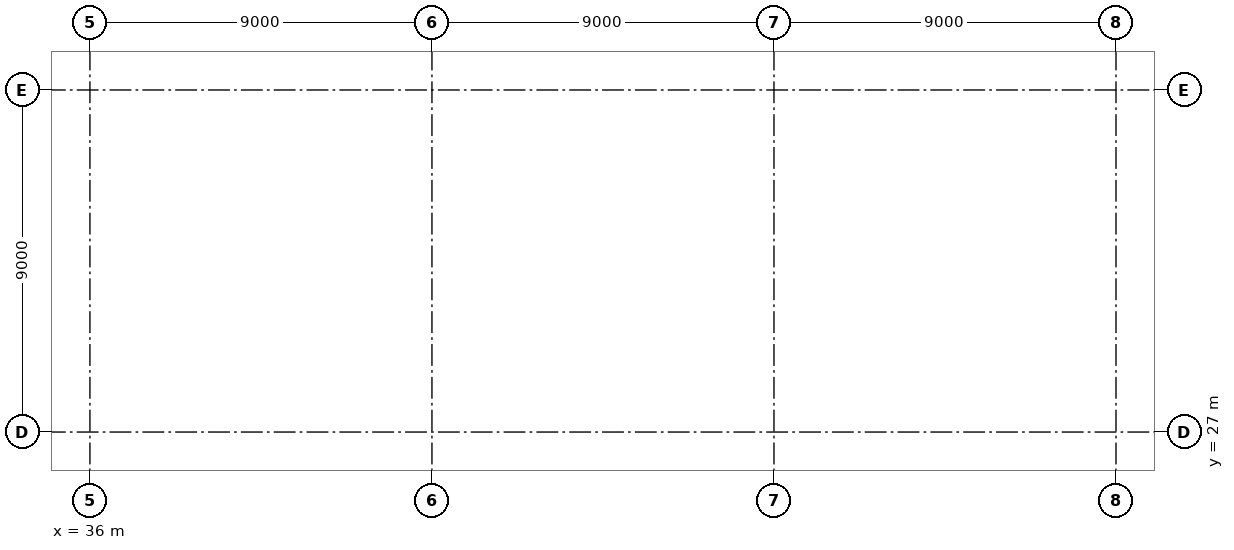
"""IFC4 building model, lengths in metres.
Left out: names, types, materials, properties, quantities, classifications, styles, units other than length and angle.
Written with IfcOpenShell. Run it as: python <this file> out.ifc"""

import sys

from ifc_helpers import new_model, si_unit, direction, frame, frame_2d, origin, origin_2d, place, context, subcontext, project, spatial, rectangle, i_section, extrude, element, fill, save


model = new_model("IFC4")
c1 = context("Model", 3, precision=1e-05, world=origin(), true_north=direction((0.0, 1.0)))
c2 = subcontext(c1, "Body", "Model", "MODEL_VIEW")
j1 = project(units=[si_unit("LENGTHUNIT", "METRE"), si_unit("PLANEANGLEUNIT", "RADIAN")], contexts=[c1])
p1 = place(None, origin())
s1 = spatial("IfcSite", under=j1, at=p1, CompositionType="ELEMENT")
p2 = place(p1, origin())
s2 = spatial("IfcBuilding", under=s1, at=p2, CompositionType="ELEMENT")
p3 = place(p2, origin())
s3 = spatial("IfcBuildingStorey", under=s2, at=p3, CompositionType="ELEMENT", Elevation=0.0)
p4 = place(p3, frame((36.0, 27.0, 0.0), z_axis=(0.0, 0.0, 1.0), x_axis=(1.0, 0.0, 0.0)))
e1 = element("IfcColumn", 1, at=p4, inside=s3, PredefinedType="COLUMN", context=c2, shape_type="SweptSolid", body=[
    extrude(i_section(OverallWidth=0.5, OverallDepth=0.48, WebThickness=0.04, FlangeThickness=0.04, at=origin_2d()), origin(), (0.0, 0.0, 1.0), 5.0),
])
p5 = place(p3, frame((45.0, 27.0, 0.0), z_axis=(0.0, 0.0, 1.0), x_axis=(1.0, 0.0, 0.0)))
e2 = element("IfcColumn", 2, at=p5, inside=s3, PredefinedType="COLUMN", context=c2, shape_type="SweptSolid", body=[
    extrude(i_section(OverallWidth=0.309, OverallDepth=0.321, WebThickness=0.014, FlangeThickness=0.022, FilletRadius=0.017, at=origin_2d()), origin(), (0.0, 0.0, 1.0), 5.0),
])
p6 = place(p3, frame((54.0, 27.0, 0.0), z_axis=(0.0, 0.0, 1.0), x_axis=(1.0, 0.0, 0.0)))
e3 = element("IfcColumn", 3, at=p6, inside=s3, PredefinedType="COLUMN", context=c2, shape_type="SweptSolid", body=[
    extrude(i_section(OverallWidth=0.5, OverallDepth=0.48, WebThickness=0.04, FlangeThickness=0.04, at=origin_2d()), origin(), (0.0, 0.0, 1.0), 5.0),
])
p7 = place(p3, frame((63.0, 27.0, 0.0), z_axis=(0.0, 0.0, 1.0), x_axis=(1.0, 0.0, 0.0)))
e4 = element("IfcColumn", 4, at=p7, inside=s3, PredefinedType="COLUMN", context=c2, shape_type="SweptSolid", body=[
    extrude(i_section(OverallWidth=0.311, OverallDepth=0.327, WebThickness=0.016, FlangeThickness=0.025, FilletRadius=0.017, at=origin_2d()), origin(), (0.0, 0.0, 1.0), 5.0),
])
p8 = place(p3, frame((36.0, 36.0, 0.0), z_axis=(0.0, 0.0, 1.0), x_axis=(1.0, 0.0, 0.0)))
e5 = element("IfcColumn", 5, at=p8, inside=s3, PredefinedType="COLUMN", context=c2, shape_type="SweptSolid", body=[
    extrude(i_section(OverallWidth=0.5, OverallDepth=0.48, WebThickness=0.04, FlangeThickness=0.04, at=origin_2d()), origin(), (0.0, 0.0, 1.0), 5.0),
])
p9 = place(p3, frame((45.0, 36.0, 0.0), z_axis=(0.0, 0.0, 1.0), x_axis=(1.0, 0.0, 0.0)))
e6 = element("IfcColumn", 6, at=p9, inside=s3, PredefinedType="COLUMN", context=c2, shape_type="SweptSolid", body=[
    extrude(i_section(OverallWidth=0.309, OverallDepth=0.321, WebThickness=0.014, FlangeThickness=0.022, FilletRadius=0.017, at=origin_2d()), origin(), (0.0, 0.0, 1.0), 5.0),
])
p10 = place(p3, frame((54.0, 36.0, 0.0), z_axis=(0.0, 0.0, 1.0), x_axis=(1.0, 0.0, 0.0)))
e7 = element("IfcColumn", 7, at=p10, inside=s3, PredefinedType="COLUMN", context=c2, shape_type="SweptSolid", body=[
    extrude(i_section(OverallWidth=0.5, OverallDepth=0.48, WebThickness=0.04, FlangeThickness=0.04, at=origin_2d()), origin(), (0.0, 0.0, 1.0), 5.0),
])
p11 = place(p3, frame((63.0, 36.0, 0.0), z_axis=(0.0, 0.0, 1.0), x_axis=(1.0, 0.0, 0.0)))
e8 = element("IfcColumn", 8, at=p11, inside=s3, PredefinedType="COLUMN", context=c2, shape_type="SweptSolid", body=[
    extrude(i_section(OverallWidth=0.311, OverallDepth=0.327, WebThickness=0.016, FlangeThickness=0.025, FilletRadius=0.017, at=origin_2d()), origin(), (0.0, 0.0, 1.0), 5.0),
])
p12 = place(p3, frame((39.048, 27.1, 0.0), z_axis=(0.0, 0.0, 1.0), x_axis=(1.0, 0.0, 0.0)))
e9 = element("IfcWall", 9, at=p12, inside=s3, PredefinedType="PARTITIONING", context=c2, shape_type="SweptSolid", body=[
    extrude(rectangle(XDim=3.0, YDim=0.2, at=frame_2d((1.5, 0.0))), origin(), (0.0, 0.0, 1.0), 4.228),
])
p13 = place(p12, frame((0.55, 0.0, 0.0)))
e10 = element("IfcOpeningElement", 10, at=p13, cuts=e9, PredefinedType="OPENING", context=c2, shape_type="SweptSolid", body=[
    extrude(rectangle(XDim=1.8, YDim=2.1, at=frame_2d((0.9, 1.05))), frame((0.0, 0.11, 0.0), z_axis=(0.0, -1.0, 0.0), x_axis=(1.0, 0.0, 0.0)), (0.0, 0.0, 1.0), 0.22),
])
for number, where, z_axis, x_axis in (
    (11, (47.952, 27.1, 0.0), (0.0, 0.0, 1.0), (1.0, 0.0, 0.0)),
    (12, (57.047, 27.1, 0.0), (0.0, 0.0, 1.0), (1.0, 0.0, 0.0)),
):
    element("IfcWall", number, at=place(p3, frame(where, z_axis=z_axis, x_axis=x_axis)), inside=s3, PredefinedType="PARTITIONING", context=c2, shape_type="SweptSolid", body=[
        extrude(rectangle(XDim=3.0, YDim=0.2, at=frame_2d((1.5, 0.0))), origin(), (0.0, 0.0, 1.0), 4.228),
    ])
p14 = place(p3, frame((36.1, 30.0, 0.0), z_axis=(0.0, 0.0, 1.0), x_axis=(0.0, 1.0, 0.0)))
e13 = element("IfcWall", 13, at=p14, inside=s3, PredefinedType="PARTITIONING", context=c2, shape_type="SweptSolid", body=[
    extrude(rectangle(XDim=3.0, YDim=0.2, at=frame_2d((1.5, 0.0))), origin(), (0.0, 0.0, 1.0), 4.228),
])
p15 = place(p14, frame((0.55, 0.0, 0.0)))
e14 = element("IfcOpeningElement", 14, at=p15, cuts=e13, PredefinedType="OPENING", context=c2, shape_type="SweptSolid", body=[
    extrude(rectangle(XDim=1.8, YDim=2.1, at=frame_2d((0.9, 1.05))), frame((0.0, 0.11, 0.0), z_axis=(0.0, -1.0, 0.0), x_axis=(1.0, 0.0, 0.0)), (0.0, 0.0, 1.0), 0.22),
])
p16 = place(p3, frame((62.9, 30.0, 0.0), z_axis=(0.0, 0.0, 1.0), x_axis=(0.0, 1.0, 0.0)))
e15 = element("IfcWall", 15, at=p16, inside=s3, PredefinedType="PARTITIONING", context=c2, shape_type="SweptSolid", body=[
    extrude(rectangle(XDim=3.0, YDim=0.2, at=frame_2d((1.5, 0.0))), origin(), (0.0, 0.0, 1.0), 4.228),
])
p17 = place(p16, frame((0.55, 0.0, 0.0)))
e16 = element("IfcOpeningElement", 16, at=p17, cuts=e15, PredefinedType="OPENING", context=c2, shape_type="SweptSolid", body=[
    extrude(rectangle(XDim=1.8, YDim=2.1, at=frame_2d((0.9, 1.05))), frame((0.0, 0.11, 0.0), z_axis=(0.0, -1.0, 0.0), x_axis=(1.0, 0.0, 0.0)), (0.0, 0.0, 1.0), 0.22),
])
p18 = place(p3, frame((39.048, 35.9, 0.0), z_axis=(0.0, 0.0, 1.0), x_axis=(1.0, 0.0, 0.0)))
e17 = element("IfcWall", 17, at=p18, inside=s3, PredefinedType="PARTITIONING", context=c2, shape_type="SweptSolid", body=[
    extrude(rectangle(XDim=3.0, YDim=0.2, at=frame_2d((1.5, 0.0))), origin(), (0.0, 0.0, 1.0), 4.228),
])
p19 = place(p18, frame((0.55, 0.0, 0.0)))
e18 = element("IfcOpeningElement", 18, at=p19, cuts=e17, PredefinedType="OPENING", context=c2, shape_type="SweptSolid", body=[
    extrude(rectangle(XDim=1.8, YDim=2.4, at=frame_2d((0.9, 1.2))), frame((0.0, 0.11, 0.0), z_axis=(0.0, -1.0, 0.0), x_axis=(1.0, 0.0, 0.0)), (0.0, 0.0, 1.0), 0.22),
])
p20 = place(p3, frame((47.952, 35.9, 0.0), z_axis=(0.0, 0.0, 1.0), x_axis=(1.0, 0.0, 0.0)))
e19 = element("IfcWall", 19, at=p20, inside=s3, PredefinedType="PARTITIONING", context=c2, shape_type="SweptSolid", body=[
    extrude(rectangle(XDim=3.0, YDim=0.2, at=frame_2d((1.5, 0.0))), origin(), (0.0, 0.0, 1.0), 4.228),
])
p21 = place(p3, frame((54.25, 35.9, 0.0), z_axis=(0.0, 0.0, 1.0), x_axis=(1.0, 0.0, 0.0)))
e20 = element("IfcWall", 20, at=p21, inside=s3, PredefinedType="PARTITIONING", context=c2, shape_type="SweptSolid", body=[
    extrude(rectangle(XDim=8.594, YDim=0.2, at=frame_2d((4.297, 0.0))), origin(), (0.0, 0.0, 1.0), 4.228),
])
p22 = place(p3, frame((63.0, 36.164, 0.0), z_axis=(0.0, 0.0, 1.0), x_axis=(0.0, 1.0, 0.0)))
e21 = element("IfcWall", 21, at=p22, inside=s3, PredefinedType="PARTITIONING", context=c2, shape_type="SweptSolid", body=[
    extrude(rectangle(XDim=4.336, YDim=0.2, at=frame_2d((2.168, 0.0))), origin(), (0.0, 0.0, 1.0), 4.302),
])
p23 = place(p3, frame((54.0, 36.24, 0.0), z_axis=(0.0, 0.0, 1.0), x_axis=(0.0, 1.0, 0.0)))
e22 = element("IfcWall", 22, at=p23, inside=s3, PredefinedType="PARTITIONING", context=c2, shape_type="SweptSolid", body=[
    extrude(rectangle(XDim=8.52, YDim=0.2, at=frame_2d((4.26, 0.0))), origin(), (0.0, 0.0, 1.0), 4.302),
])
p24 = place(p23, frame((3.35, 0.0, 0.0)))
e23 = element("IfcOpeningElement", 23, at=p24, cuts=e22, PredefinedType="OPENING", context=c2, shape_type="SweptSolid", body=[
    extrude(rectangle(XDim=1.8, YDim=2.1, at=frame_2d((0.9, 1.05))), frame((0.0, 0.11, 0.0), z_axis=(0.0, -1.0, 0.0), x_axis=(1.0, 0.0, 0.0)), (0.0, 0.0, 1.0), 0.22),
])
p25 = place(p13, frame((1.8, 0.0, 0.0), z_axis=(0.0, 0.0, 1.0), x_axis=(-1.0, 0.0, 0.0)))
e24 = element("IfcDoor", 24, at=p25, inside=s3, OperationType="DOUBLE_DOOR_SINGLE_SWING", PredefinedType="DOOR", context=c2, shape_type="SweptSolid", body=[
    extrude(rectangle(XDim=1.8, YDim=2.1, at=frame_2d((0.9, 1.05))), frame((0.0, 0.025, 0.0), z_axis=(0.0, -1.0, 0.0), x_axis=(1.0, 0.0, 0.0)), (0.0, 0.0, 1.0), 0.05),
])
fill(e10, e24)
p26 = place(p15, frame((1.8, 0.0, 0.0), z_axis=(0.0, 0.0, 1.0), x_axis=(-1.0, 0.0, 0.0)))
e25 = element("IfcDoor", 25, at=p26, inside=s3, OperationType="DOUBLE_DOOR_SINGLE_SWING", PredefinedType="DOOR", context=c2, shape_type="SweptSolid", body=[
    extrude(rectangle(XDim=1.8, YDim=2.1, at=frame_2d((0.9, 1.05))), frame((0.0, 0.025, 0.0), z_axis=(0.0, -1.0, 0.0), x_axis=(1.0, 0.0, 0.0)), (0.0, 0.0, 1.0), 0.05),
])
fill(e14, e25)
p27 = place(p17, origin())
e26 = element("IfcDoor", 26, at=p27, inside=s3, OperationType="DOUBLE_DOOR_SINGLE_SWING", PredefinedType="DOOR", context=c2, shape_type="SweptSolid", body=[
    extrude(rectangle(XDim=1.8, YDim=2.1, at=frame_2d((0.9, 1.05))), frame((0.0, 0.025, 0.0), z_axis=(0.0, -1.0, 0.0), x_axis=(1.0, 0.0, 0.0)), (0.0, 0.0, 1.0), 0.05),
])
fill(e16, e26)
p28 = place(p19, frame((1.8, 0.0, 0.0), z_axis=(0.0, 0.0, 1.0), x_axis=(-1.0, 0.0, 0.0)))
e27 = element("IfcDoor", 27, at=p28, inside=s3, OperationType="DOUBLE_DOOR_SINGLE_SWING", PredefinedType="DOOR", context=c2, shape_type="SweptSolid", body=[
    extrude(rectangle(XDim=1.8, YDim=2.4, at=frame_2d((0.9, 1.2))), frame((0.0, 0.025, 0.0), z_axis=(0.0, -1.0, 0.0), x_axis=(1.0, 0.0, 0.0)), (0.0, 0.0, 1.0), 0.05),
])
fill(e18, e27)
save(model, sys.argv[1])
